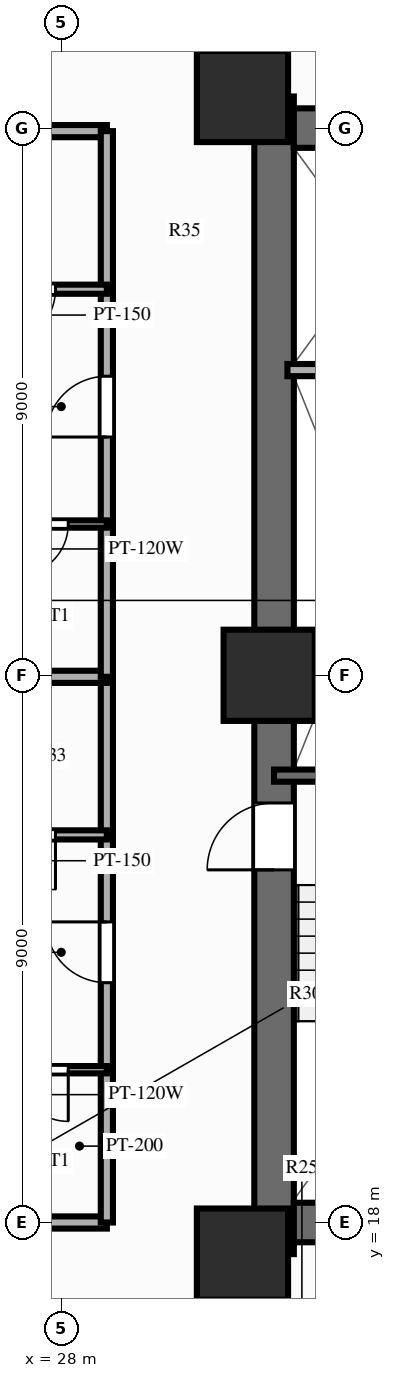
"""IFC4 building model, lengths in metres.
Left out: names, types, materials, properties, quantities, classifications, styles, units other than length and angle.
Written with IfcOpenShell. Run it as: python <this file> out.ifc"""

import sys

from ifc_helpers import new_model, si_unit, direction, frame, frame_2d, origin, origin_2d, place, context, subcontext, project, spatial, rectangle, extrude, source, transform, mapped, element, fill, save


model = new_model("IFC4")
c1 = context("Model", 3, precision=1e-05, world=origin(), true_north=direction((0.0, 1.0)))
c2 = subcontext(c1, "Body", "Model", "MODEL_VIEW")
j1 = project(units=[si_unit("LENGTHUNIT", "METRE"), si_unit("PLANEANGLEUNIT", "RADIAN")], contexts=[c1])
p1 = place(None, origin())
s1 = spatial("IfcSite", under=j1, at=p1, CompositionType="ELEMENT")
p2 = place(p1, origin())
s2 = spatial("IfcBuilding", under=s1, at=p2, CompositionType="ELEMENT")
p3 = place(p2, frame((0.0, 0.0, 25.4)))
s3 = spatial("IfcBuildingStorey", under=s2, at=p3, CompositionType="ELEMENT", Elevation=25.4)
p4 = place(p3, frame((31.5, 17.48, 0.0), z_axis=(0.0, 0.0, 1.0), x_axis=(0.0, 1.0, 0.0)))
e1 = element("IfcWall", 1, at=p4, inside=s3, PredefinedType="SHEAR", context=c2, shape_type="SweptSolid", body=[
    extrude(rectangle(XDim=19.04, YDim=0.65, at=frame_2d((9.52, 0.0))), origin(), (0.0, 0.0, 1.0), 3.0),
])
p5 = place(p4, frame((6.32, 0.0, 0.0)))
e2 = element("IfcOpeningElement", 2, at=p5, cuts=e1, PredefinedType="OPENING", context=c2, shape_type="SweptSolid", body=[
    extrude(rectangle(XDim=1.1, YDim=2.15, at=frame_2d((0.55, 1.075))), frame((0.0, 0.337, 0.0), z_axis=(0.0, -1.0, 0.0), x_axis=(1.0, 0.0, 0.0)), (0.0, 0.0, 1.0), 0.674),
])
p6 = place(p3, frame((31.825, 18.0, 0.0), z_axis=(0.0, 0.0, 1.0), x_axis=(1.0, 0.0, 0.0)))
e3 = element("IfcWall", 3, at=p6, inside=s3, PredefinedType="SHEAR", context=c2, shape_type="SweptSolid", body=[
    extrude(rectangle(XDim=12.35, YDim=0.65, at=frame_2d((6.175, 0.0))), origin(), (0.0, 0.0, 1.0), 3.0),
])
p7 = place(p3, frame((31.825, 36.0, 0.0), z_axis=(0.0, 0.0, 1.0), x_axis=(1.0, 0.0, 0.0)))
e4 = element("IfcWall", 4, at=p7, inside=s3, PredefinedType="SHEAR", context=c2, shape_type="SweptSolid", body=[
    extrude(rectangle(XDim=12.35, YDim=0.65, at=frame_2d((6.175, 0.0))), origin(), (0.0, 0.0, 1.0), 3.0),
])
p8 = place(p7, frame((5.125, 0.0, 0.0), z_axis=(0.0, 0.0, 1.0), x_axis=(-1.0, 0.0, 0.0)))
e5 = element("IfcOpeningElement", 5, at=p8, cuts=e4, PredefinedType="OPENING", context=c2, shape_type="SweptSolid", body=[
    extrude(rectangle(XDim=1.4, YDim=2.15, at=frame_2d((0.7, 1.075))), frame((0.0, 0.337, 0.0), z_axis=(0.0, -1.0, 0.0), x_axis=(1.0, 0.0, 0.0)), (0.0, 0.0, 1.0), 0.674),
])
m1 = source(origin(), c2, "Body", "SweptSolid", [
    extrude(rectangle(XDim=1.5, YDim=1.5, at=origin_2d()), origin(), (0.0, 0.0, 1.0), 3.0),
])
for number, where, z_axis, x_axis in (
    (6, (30.98, 17.48, 0.0), (0.0, 0.0, 1.0), (1.0, 0.0, 0.0)),
    (7, (30.98, 36.52, 0.0), (0.0, 0.0, 1.0), (1.0, 0.0, 0.0)),
    (8, (31.42, 27.0, 0.0), (0.0, 0.0, 1.0), (1.0, 0.0, 0.0)),
):
    element("IfcColumn", number, at=place(p3, frame(where, z_axis=z_axis, x_axis=x_axis)), inside=s3, PredefinedType="COLUMN", context=c2, shape_type="MappedRepresentation", body=[
        mapped(m1, transform((0.0, 0.0, 0.0), scale=1.0)),
    ])
p9 = place(p3, frame((31.5, 25.35, 0.0), z_axis=(0.0, 0.0, 1.0), x_axis=(1.0, 0.0, 0.0)))
e9 = element("IfcWall", 9, at=p9, inside=s3, PredefinedType="SOLIDWALL", context=c2, shape_type="SweptSolid", body=[
    extrude(rectangle(XDim=3.93, YDim=0.2, at=frame_2d((1.965, 0.0))), origin(), (0.0, 0.0, 1.0), 2.79),
])
p10 = place(p3, frame((31.72, 32.02, 0.0), z_axis=(0.0, 0.0, 1.0), x_axis=(1.0, 0.0, 0.0)))
e10 = element("IfcWall", 10, at=p10, inside=s3, PredefinedType="PARTITIONING", context=c2, shape_type="SweptSolid", body=[
    extrude(rectangle(XDim=2.8, YDim=0.2, at=frame_2d((1.4, 0.0))), origin(), (0.0, 0.0, 1.0), 2.79),
])
for number, where, z_axis, x_axis in (
    (11, (28.75, 18.0, 0.0), (0.0, 0.0, 1.0), (-1.0, 0.0, 0.0)),
    (12, (28.75, 35.95, 0.0), (0.0, 0.0, 1.0), (-1.0, 0.0, 0.0)),
):
    element("IfcWall", number, at=place(p3, frame(where, z_axis=z_axis, x_axis=x_axis)), inside=s3, PredefinedType="PARTITIONING", context=c2, shape_type="SweptSolid", body=[
        extrude(rectangle(XDim=16.6, YDim=0.2, at=frame_2d((8.3, 0.0))), origin(), (0.0, 0.0, 1.0), 2.24),
    ])
p11 = place(p3, frame((28.75, 18.0, 0.0), z_axis=(0.0, 0.0, 1.0), x_axis=(0.0, 1.0, 0.0)))
e13 = element("IfcWall", 13, at=p11, inside=s3, PredefinedType="PARTITIONING", context=c2, shape_type="SweptSolid", body=[
    extrude(rectangle(XDim=2.513, YDim=0.2, at=frame_2d((1.256, 0.0))), origin(), (0.0, 0.0, 1.0), 2.79),
])
p12 = place(p3, frame((28.75, 20.513, 0.0), z_axis=(0.0, 0.0, 1.0), x_axis=(0.0, 1.0, 0.0)))
e14 = element("IfcWall", 14, at=p12, inside=s3, PredefinedType="PARTITIONING", context=c2, shape_type="SweptSolid", body=[
    extrude(rectangle(XDim=3.862, YDim=0.2, at=frame_2d((1.931, 0.0))), origin(), (0.0, 0.0, 1.0), 2.79),
])
p13 = place(p12, frame((1.431, 0.0, 0.0)))
e15 = element("IfcOpeningElement", 15, at=p13, cuts=e14, PredefinedType="OPENING", context=c2, shape_type="SweptSolid", body=[
    extrude(rectangle(XDim=1.0, YDim=2.15, at=frame_2d((0.5, 1.075))), frame((0.0, 0.112, 0.0), z_axis=(0.0, -1.0, 0.0), x_axis=(1.0, 0.0, 0.0)), (0.0, 0.0, 1.0), 0.224),
])
p14 = place(p3, frame((28.75, 24.375, 0.0), z_axis=(0.0, 0.0, 1.0), x_axis=(0.0, 1.0, 0.0)))
e16 = element("IfcWall", 16, at=p14, inside=s3, PredefinedType="PARTITIONING", context=c2, shape_type="SweptSolid", body=[
    extrude(rectangle(XDim=2.6, YDim=0.2, at=frame_2d((1.3, 0.0))), origin(), (0.0, 0.0, 1.0), 2.79),
])
p15 = place(p3, frame((28.75, 20.513, 0.0), z_axis=(0.0, 0.0, 1.0), x_axis=(-1.0, 0.0, 0.0)))
e17 = element("IfcWall", 17, at=p15, inside=s3, PredefinedType="PARTITIONING", context=c2, shape_type="SweptSolid", body=[
    extrude(rectangle(XDim=2.12, YDim=0.12, at=frame_2d((1.06, 0.0))), origin(), (0.0, 0.0, 1.0), 2.79),
])
p16 = place(p15, frame((0.635, 0.0, 0.0)))
e18 = element("IfcOpeningElement", 18, at=p16, cuts=e17, PredefinedType="OPENING", context=c2, shape_type="SweptSolid", body=[
    extrude(rectangle(XDim=0.85, YDim=2.05, at=frame_2d((0.425, 1.025))), frame((0.0, 0.072, 0.0), z_axis=(0.0, -1.0, 0.0), x_axis=(1.0, 0.0, 0.0)), (0.0, 0.0, 1.0), 0.144),
])
p17 = place(p3, frame((28.75, 24.375, 0.0), z_axis=(0.0, 0.0, 1.0), x_axis=(-1.0, 0.0, 0.0)))
e19 = element("IfcWall", 19, at=p17, inside=s3, PredefinedType="PARTITIONING", context=c2, shape_type="SweptSolid", body=[
    extrude(rectangle(XDim=2.59, YDim=0.15, at=frame_2d((1.295, 0.0))), origin(), (0.0, 0.0, 1.0), 2.79),
])
p18 = place(p17, frame((0.845, 0.0, 0.0)))
e20 = element("IfcOpeningElement", 20, at=p18, cuts=e19, PredefinedType="OPENING", context=c2, shape_type="SweptSolid", body=[
    extrude(rectangle(XDim=0.9, YDim=2.1, at=frame_2d((0.45, 1.05))), frame((0.0, 0.087, 0.0), z_axis=(0.0, -1.0, 0.0), x_axis=(1.0, 0.0, 0.0)), (0.0, 0.0, 1.0), 0.174),
])
p19 = place(p3, frame((28.75, 26.975, 0.0), z_axis=(0.0, 0.0, 1.0), x_axis=(-1.0, 0.0, 0.0)))
e21 = element("IfcWall", 21, at=p19, inside=s3, PredefinedType="PARTITIONING", context=c2, shape_type="SweptSolid", body=[
    extrude(rectangle(XDim=16.6, YDim=0.2, at=frame_2d((8.3, 0.0))), origin(), (0.0, 0.0, 1.0), 2.79),
])
p20 = place(p3, frame((28.75, 26.975, 0.0), z_axis=(0.0, 0.0, 1.0), x_axis=(0.0, 1.0, 0.0)))
e22 = element("IfcWall", 22, at=p20, inside=s3, PredefinedType="PARTITIONING", context=c2, shape_type="SweptSolid", body=[
    extrude(rectangle(XDim=2.513, YDim=0.2, at=frame_2d((1.256, 0.0))), origin(), (0.0, 0.0, 1.0), 2.79),
])
p21 = place(p3, frame((28.75, 29.488, 0.0), z_axis=(0.0, 0.0, 1.0), x_axis=(0.0, 1.0, 0.0)))
e23 = element("IfcWall", 23, at=p21, inside=s3, PredefinedType="PARTITIONING", context=c2, shape_type="SweptSolid", body=[
    extrude(rectangle(XDim=3.862, YDim=0.2, at=frame_2d((1.931, 0.0))), origin(), (0.0, 0.0, 1.0), 2.79),
])
p22 = place(p21, frame((1.431, 0.0, 0.0)))
e24 = element("IfcOpeningElement", 24, at=p22, cuts=e23, PredefinedType="OPENING", context=c2, shape_type="SweptSolid", body=[
    extrude(rectangle(XDim=1.0, YDim=2.15, at=frame_2d((0.5, 1.075))), frame((0.0, 0.112, 0.0), z_axis=(0.0, -1.0, 0.0), x_axis=(1.0, 0.0, 0.0)), (0.0, 0.0, 1.0), 0.224),
])
p23 = place(p3, frame((28.75, 33.35, 0.0), z_axis=(0.0, 0.0, 1.0), x_axis=(0.0, 1.0, 0.0)))
e25 = element("IfcWall", 25, at=p23, inside=s3, PredefinedType="PARTITIONING", context=c2, shape_type="SweptSolid", body=[
    extrude(rectangle(XDim=2.6, YDim=0.2, at=frame_2d((1.3, 0.0))), origin(), (0.0, 0.0, 1.0), 2.79),
])
p24 = place(p3, frame((28.75, 29.488, 0.0), z_axis=(0.0, 0.0, 1.0), x_axis=(-1.0, 0.0, 0.0)))
e26 = element("IfcWall", 26, at=p24, inside=s3, PredefinedType="PARTITIONING", context=c2, shape_type="SweptSolid", body=[
    extrude(rectangle(XDim=2.12, YDim=0.12, at=frame_2d((1.06, 0.0))), origin(), (0.0, 0.0, 1.0), 2.79),
])
p25 = place(p24, frame((0.635, 0.0, 0.0)))
e27 = element("IfcOpeningElement", 27, at=p25, cuts=e26, PredefinedType="OPENING", context=c2, shape_type="SweptSolid", body=[
    extrude(rectangle(XDim=0.85, YDim=2.05, at=frame_2d((0.425, 1.025))), frame((0.0, 0.072, 0.0), z_axis=(0.0, -1.0, 0.0), x_axis=(1.0, 0.0, 0.0)), (0.0, 0.0, 1.0), 0.144),
])
p26 = place(p3, frame((28.75, 33.35, 0.0), z_axis=(0.0, 0.0, 1.0), x_axis=(-1.0, 0.0, 0.0)))
e28 = element("IfcWall", 28, at=p26, inside=s3, PredefinedType="PARTITIONING", context=c2, shape_type="SweptSolid", body=[
    extrude(rectangle(XDim=2.59, YDim=0.15, at=frame_2d((1.295, 0.0))), origin(), (0.0, 0.0, 1.0), 2.79),
])
p27 = place(p26, frame((0.845, 0.0, 0.0)))
e29 = element("IfcOpeningElement", 29, at=p27, cuts=e28, PredefinedType="OPENING", context=c2, shape_type="SweptSolid", body=[
    extrude(rectangle(XDim=0.9, YDim=2.1, at=frame_2d((0.45, 1.05))), frame((0.0, 0.087, 0.0), z_axis=(0.0, -1.0, 0.0), x_axis=(1.0, 0.0, 0.0)), (0.0, 0.0, 1.0), 0.174),
])
m2 = source(origin(), c2, "Body", "SweptSolid", [
    extrude(rectangle(XDim=1.1, YDim=2.15, at=frame_2d((0.55, 1.075))), frame((0.0, 0.025, 0.0), z_axis=(0.0, -1.0, 0.0), x_axis=(1.0, 0.0, 0.0)), (0.0, 0.0, 1.0), 0.05),
])
p28 = place(p5, origin())
e30 = element("IfcDoor", 30, at=p28, inside=s3, OperationType="SINGLE_SWING_LEFT", PredefinedType="DOOR", context=c2, shape_type="MappedRepresentation", body=[
    mapped(m2, transform((0.0, 0.0, 0.0), scale=1.0)),
])
fill(e2, e30)
m3 = source(origin(), c2, "Body", "SweptSolid", [
    extrude(rectangle(XDim=1.0, YDim=2.15, at=frame_2d((0.5, 1.075))), frame((0.0, 0.025, 0.0), z_axis=(0.0, -1.0, 0.0), x_axis=(1.0, 0.0, 0.0)), (0.0, 0.0, 1.0), 0.05),
])
p29 = place(p13, origin())
e31 = element("IfcDoor", 31, at=p29, inside=s3, OperationType="SINGLE_SWING_RIGHT", PredefinedType="DOOR", context=c2, shape_type="MappedRepresentation", body=[
    mapped(m3, transform((0.0, 0.0, 0.0), scale=1.0)),
])
fill(e15, e31)
m4 = source(origin(), c2, "Body", "SweptSolid", [
    extrude(rectangle(XDim=0.85, YDim=2.05, at=frame_2d((0.425, 1.025))), frame((0.0, 0.025, 0.0), z_axis=(0.0, -1.0, 0.0), x_axis=(1.0, 0.0, 0.0)), (0.0, 0.0, 1.0), 0.05),
])
p30 = place(p16, origin())
e32 = element("IfcDoor", 32, at=p30, inside=s3, OperationType="SINGLE_SWING_LEFT", PredefinedType="DOOR", context=c2, shape_type="MappedRepresentation", body=[
    mapped(m4, transform((0.0, 0.0, 0.0), scale=1.0)),
])
fill(e18, e32)
m5 = source(origin(), c2, "Body", "SweptSolid", [
    extrude(rectangle(XDim=0.9, YDim=2.1, at=frame_2d((0.45, 1.05))), frame((0.0, 0.025, 0.0), z_axis=(0.0, -1.0, 0.0), x_axis=(1.0, 0.0, 0.0)), (0.0, 0.0, 1.0), 0.05),
])
p31 = place(p18, origin())
e33 = element("IfcDoor", 33, at=p31, inside=s3, OperationType="SINGLE_SWING_LEFT", PredefinedType="DOOR", context=c2, shape_type="MappedRepresentation", body=[
    mapped(m5, transform((0.0, 0.0, 0.0), scale=1.0)),
])
fill(e20, e33)
p32 = place(p22, origin())
e34 = element("IfcDoor", 34, at=p32, inside=s3, OperationType="SINGLE_SWING_LEFT", PredefinedType="DOOR", context=c2, shape_type="MappedRepresentation", body=[
    mapped(m3, transform((0.0, 0.0, 0.0), scale=1.0)),
])
fill(e24, e34)
p33 = place(p25, origin())
e35 = element("IfcDoor", 35, at=p33, inside=s3, OperationType="SINGLE_SWING_RIGHT", PredefinedType="DOOR", context=c2, shape_type="MappedRepresentation", body=[
    mapped(m4, transform((0.0, 0.0, 0.0), scale=1.0)),
])
fill(e27, e35)
p34 = place(p27, origin())
e36 = element("IfcDoor", 36, at=p34, inside=s3, OperationType="SINGLE_SWING_RIGHT", PredefinedType="DOOR", context=c2, shape_type="MappedRepresentation", body=[
    mapped(m5, transform((0.0, 0.0, 0.0), scale=1.0)),
])
fill(e29, e36)
save(model, sys.argv[1])
